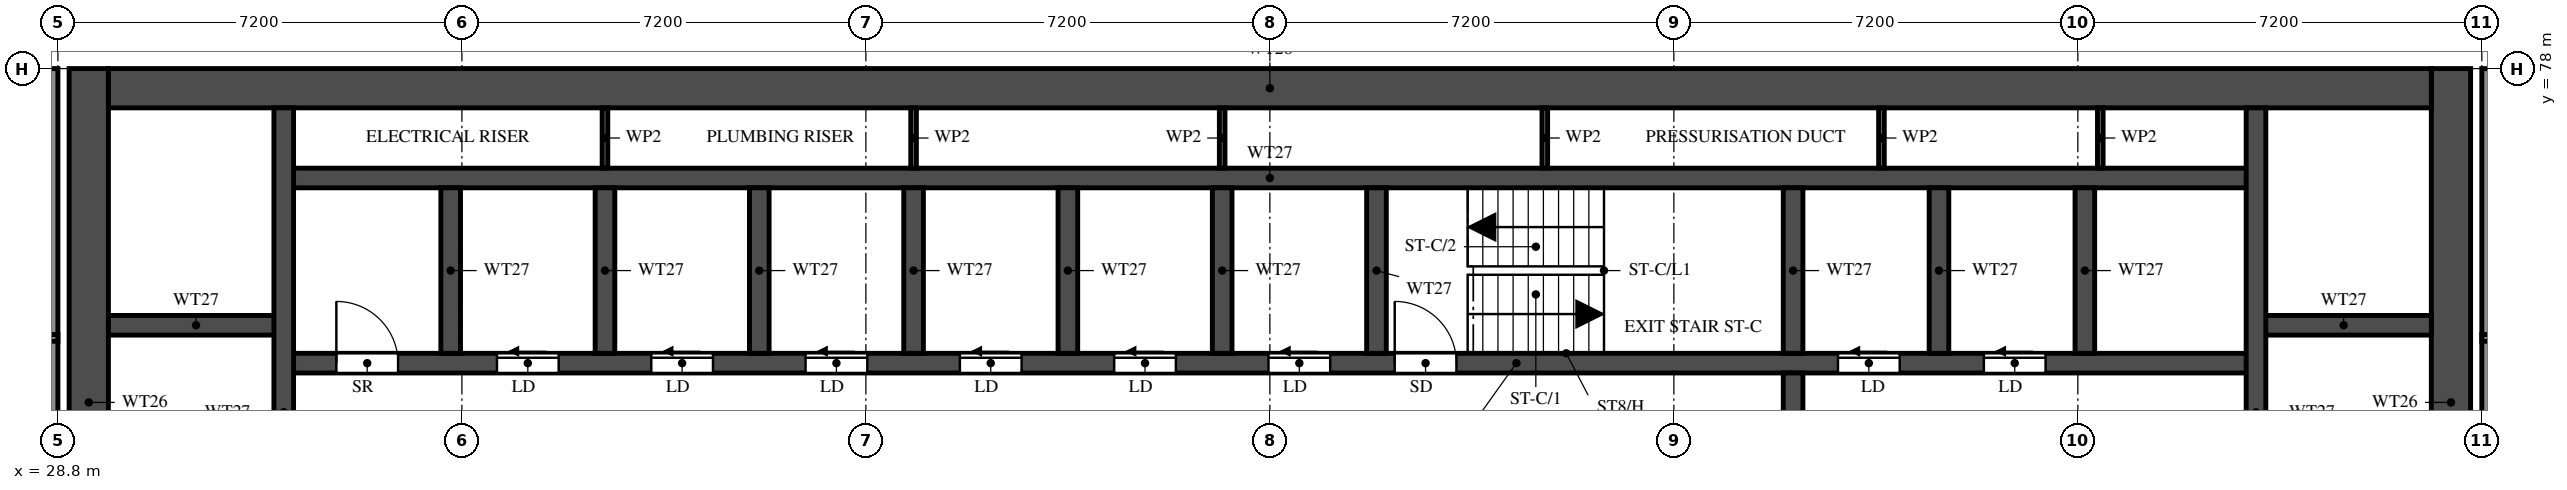
"""IFC4 building model, lengths in metres.
Left out: names, types, materials, properties, quantities, classifications, styles, units other than length and angle.
Written with IfcOpenShell. Run it as: python <this file> out.ifc"""

import sys

from ifc_helpers import new_model, si_unit, direction, frame, frame_2d, origin, place, context, subcontext, project, spatial, rectangle, extrude, element, fill, save


model = new_model("IFC4")
c1 = context("Model", 3, precision=1e-05, world=origin(), true_north=direction((0.0, 1.0)))
c2 = subcontext(c1, "Body", "Model", "MODEL_VIEW")
j1 = project(units=[si_unit("LENGTHUNIT", "METRE"), si_unit("PLANEANGLEUNIT", "RADIAN")], contexts=[c1])
p1 = place(None, origin())
s1 = spatial("IfcSite", under=j1, at=p1, CompositionType="ELEMENT")
p2 = place(p1, origin())
s2 = spatial("IfcBuilding", under=s1, at=p2, CompositionType="ELEMENT")
p3 = place(p2, frame((0.0, 0.0, 171.0)))
s3 = spatial("IfcBuildingStorey", under=s2, at=p3, CompositionType="ELEMENT", Elevation=171.0)
for number, where, z_axis, x_axis in (
    (1, (29.35, 66.1, 0.0), (0.0, 0.0, 1.0), (0.0, 1.0, 0.0)),
    (2, (71.45, 66.1, 0.0), (0.0, 0.0, 1.0), (0.0, 1.0, 0.0)),
):
    element("IfcWall", number, at=place(p3, frame(where, z_axis=z_axis, x_axis=x_axis)), inside=s3, PredefinedType="SHEAR", context=c2, shape_type="SweptSolid", body=[
        extrude(rectangle(XDim=11.9, YDim=0.7, at=frame_2d((5.95, 0.0))), origin(), (0.0, 0.0, 1.0), 3.2),
    ])
p4 = place(p3, frame((29.7, 77.65, 0.0), z_axis=(0.0, 0.0, 1.0), x_axis=(1.0, 0.0, 0.0)))
e3 = element("IfcWall", 3, at=p4, inside=s3, PredefinedType="SHEAR", context=c2, shape_type="SweptSolid", body=[
    extrude(rectangle(XDim=41.4, YDim=0.7, at=frame_2d((20.7, 0.0))), origin(), (0.0, 0.0, 1.0), 3.2),
])
p5 = place(p3, frame((32.825, 72.75, 0.0), z_axis=(0.0, 0.0, 1.0), x_axis=(1.0, 0.0, 0.0)))
e4 = element("IfcWall", 4, at=p5, inside=s3, PredefinedType="SHEAR", context=c2, shape_type="SweptSolid", body=[
    extrude(rectangle(XDim=35.15, YDim=0.35, at=frame_2d((17.575, 0.0))), origin(), (0.0, 0.0, 1.0), 3.2),
])
p6 = place(p5, frame((19.8, 0.0, 0.0)))
e5 = element("IfcOpeningElement", 5, at=p6, cuts=e4, PredefinedType="OPENING", context=c2, shape_type="SweptSolid", body=[
    extrude(rectangle(XDim=1.1, YDim=2.1, at=frame_2d((0.55, 1.05))), frame((0.0, 0.185, 0.0), z_axis=(0.0, -1.0, 0.0), x_axis=(1.0, 0.0, 0.0)), (0.0, 0.0, 1.0), 0.37),
])
p7 = place(p5, frame((27.7, 0.0, 0.0)))
e6 = element("IfcOpeningElement", 6, at=p7, cuts=e4, PredefinedType="OPENING", context=c2, shape_type="SweptSolid", body=[
    extrude(rectangle(XDim=1.1, YDim=2.1, at=frame_2d((0.55, 1.05))), frame((0.0, 0.185, 0.0), z_axis=(0.0, -1.0, 0.0), x_axis=(1.0, 0.0, 0.0)), (0.0, 0.0, 1.0), 0.37),
])
p8 = place(p5, frame((30.3, 0.0, 0.0)))
e7 = element("IfcOpeningElement", 7, at=p8, cuts=e4, PredefinedType="OPENING", context=c2, shape_type="SweptSolid", body=[
    extrude(rectangle(XDim=1.1, YDim=2.1, at=frame_2d((0.55, 1.05))), frame((0.0, 0.185, 0.0), z_axis=(0.0, -1.0, 0.0), x_axis=(1.0, 0.0, 0.0)), (0.0, 0.0, 1.0), 0.37),
])
p9 = place(p5, frame((3.8, 0.0, 0.0)))
e8 = element("IfcOpeningElement", 8, at=p9, cuts=e4, PredefinedType="OPENING", context=c2, shape_type="SweptSolid", body=[
    extrude(rectangle(XDim=1.1, YDim=2.1, at=frame_2d((0.55, 1.05))), frame((0.0, 0.185, 0.0), z_axis=(0.0, -1.0, 0.0), x_axis=(1.0, 0.0, 0.0)), (0.0, 0.0, 1.0), 0.37),
])
p10 = place(p5, frame((6.55, 0.0, 0.0)))
e9 = element("IfcOpeningElement", 9, at=p10, cuts=e4, PredefinedType="OPENING", context=c2, shape_type="SweptSolid", body=[
    extrude(rectangle(XDim=1.1, YDim=2.1, at=frame_2d((0.55, 1.05))), frame((0.0, 0.185, 0.0), z_axis=(0.0, -1.0, 0.0), x_axis=(1.0, 0.0, 0.0)), (0.0, 0.0, 1.0), 0.37),
])
p11 = place(p5, frame((9.3, 0.0, 0.0)))
e10 = element("IfcOpeningElement", 10, at=p11, cuts=e4, PredefinedType="OPENING", context=c2, shape_type="SweptSolid", body=[
    extrude(rectangle(XDim=1.1, YDim=2.1, at=frame_2d((0.55, 1.05))), frame((0.0, 0.185, 0.0), z_axis=(0.0, -1.0, 0.0), x_axis=(1.0, 0.0, 0.0)), (0.0, 0.0, 1.0), 0.37),
])
p12 = place(p5, frame((12.05, 0.0, 0.0)))
e11 = element("IfcOpeningElement", 11, at=p12, cuts=e4, PredefinedType="OPENING", context=c2, shape_type="SweptSolid", body=[
    extrude(rectangle(XDim=1.1, YDim=2.1, at=frame_2d((0.55, 1.05))), frame((0.0, 0.185, 0.0), z_axis=(0.0, -1.0, 0.0), x_axis=(1.0, 0.0, 0.0)), (0.0, 0.0, 1.0), 0.37),
])
p13 = place(p5, frame((14.8, 0.0, 0.0)))
e12 = element("IfcOpeningElement", 12, at=p13, cuts=e4, PredefinedType="OPENING", context=c2, shape_type="SweptSolid", body=[
    extrude(rectangle(XDim=1.1, YDim=2.1, at=frame_2d((0.55, 1.05))), frame((0.0, 0.185, 0.0), z_axis=(0.0, -1.0, 0.0), x_axis=(1.0, 0.0, 0.0)), (0.0, 0.0, 1.0), 0.37),
])
p14 = place(p5, frame((17.55, 0.0, 0.0)))
e13 = element("IfcOpeningElement", 13, at=p14, cuts=e4, PredefinedType="OPENING", context=c2, shape_type="SweptSolid", body=[
    extrude(rectangle(XDim=1.1, YDim=2.1, at=frame_2d((0.55, 1.05))), frame((0.0, 0.185, 0.0), z_axis=(0.0, -1.0, 0.0), x_axis=(1.0, 0.0, 0.0)), (0.0, 0.0, 1.0), 0.37),
])
p15 = place(p5, frame((0.938, 0.0, 0.0)))
e14 = element("IfcOpeningElement", 14, at=p15, cuts=e4, PredefinedType="OPENING", context=c2, shape_type="SweptSolid", body=[
    extrude(rectangle(XDim=1.1, YDim=2.1, at=frame_2d((0.55, 1.05))), frame((0.0, 0.185, 0.0), z_axis=(0.0, -1.0, 0.0), x_axis=(1.0, 0.0, 0.0)), (0.0, 0.0, 1.0), 0.37),
])
p16 = place(p3, frame((32.825, 76.05, 0.0), z_axis=(0.0, 0.0, 1.0), x_axis=(1.0, 0.0, 0.0)))
e15 = element("IfcWall", 15, at=p16, inside=s3, PredefinedType="SHEAR", context=c2, shape_type="SweptSolid", body=[
    extrude(rectangle(XDim=35.15, YDim=0.35, at=frame_2d((17.575, 0.0))), origin(), (0.0, 0.0, 1.0), 3.2),
])
for number, where, z_axis, x_axis in (
    (16, (29.7, 73.425, 0.0), (0.0, 0.0, 1.0), (1.0, 0.0, 0.0)),
    (17, (67.975, 73.425, 0.0), (0.0, 0.0, 1.0), (1.0, 0.0, 0.0)),
):
    element("IfcWall", number, at=place(p3, frame(where, z_axis=z_axis, x_axis=x_axis)), inside=s3, PredefinedType="SHEAR", context=c2, shape_type="SweptSolid", body=[
        extrude(rectangle(XDim=3.125, YDim=0.35, at=frame_2d((1.562, 0.0))), origin(), (0.0, 0.0, 1.0), 3.2),
    ])
p17 = place(p3, frame((32.825, 66.45, 0.0), z_axis=(0.0, 0.0, 1.0), x_axis=(0.0, 1.0, 0.0)))
e18 = element("IfcWall", 18, at=p17, inside=s3, PredefinedType="SHEAR", context=c2, shape_type="SweptSolid", body=[
    extrude(rectangle(XDim=10.85, YDim=0.35, at=frame_2d((5.425, 0.0))), origin(), (0.0, 0.0, 1.0), 3.2),
])
p18 = place(p3, frame((67.975, 66.45, 0.0), z_axis=(0.0, 0.0, 1.0), x_axis=(0.0, 1.0, 0.0)))
e19 = element("IfcWall", 19, at=p18, inside=s3, PredefinedType="SHEAR", context=c2, shape_type="SweptSolid", body=[
    extrude(rectangle(XDim=10.85, YDim=0.35, at=frame_2d((5.425, 0.0))), origin(), (0.0, 0.0, 1.0), 3.2),
])
p19 = place(p18, frame((0.15, 0.0, 0.0)))
e20 = element("IfcOpeningElement", 20, at=p19, cuts=e19, PredefinedType="OPENING", context=c2, shape_type="SweptSolid", body=[
    extrude(rectangle(XDim=1.1, YDim=2.1, at=frame_2d((0.55, 1.05))), frame((0.0, 0.185, 0.0), z_axis=(0.0, -1.0, 0.0), x_axis=(1.0, 0.0, 0.0)), (0.0, 0.0, 1.0), 0.37),
])
p20 = place(p3, frame((59.725, 66.45, 0.0), z_axis=(0.0, 0.0, 1.0), x_axis=(0.0, 1.0, 0.0)))
e21 = element("IfcWall", 21, at=p20, inside=s3, PredefinedType="SHEAR", context=c2, shape_type="SweptSolid", body=[
    extrude(rectangle(XDim=6.125, YDim=0.35, at=frame_2d((3.062, 0.0))), origin(), (0.0, 0.0, 1.0), 3.2),
])
p21 = place(p20, frame((3.85, 0.0, 0.0)))
e22 = element("IfcOpeningElement", 22, at=p21, cuts=e21, PredefinedType="OPENING", context=c2, shape_type="SweptSolid", body=[
    extrude(rectangle(XDim=1.2, YDim=2.1, at=frame_2d((0.6, 1.05))), frame((0.0, 0.185, 0.0), z_axis=(0.0, -1.0, 0.0), x_axis=(1.0, 0.0, 0.0)), (0.0, 0.0, 1.0), 0.37),
])
for number, where, z_axis, x_axis in (
    (23, (59.725, 72.925, 0.0), (0.0, 0.0, 1.0), (0.0, 1.0, 0.0)),
    (24, (35.8, 72.925, 0.0), (0.0, 0.0, 1.0), (0.0, 1.0, 0.0)),
    (25, (38.55, 72.925, 0.0), (0.0, 0.0, 1.0), (0.0, 1.0, 0.0)),
    (26, (41.3, 72.925, 0.0), (0.0, 0.0, 1.0), (0.0, 1.0, 0.0)),
    (27, (44.05, 72.925, 0.0), (0.0, 0.0, 1.0), (0.0, 1.0, 0.0)),
    (28, (46.8, 72.925, 0.0), (0.0, 0.0, 1.0), (0.0, 1.0, 0.0)),
    (29, (49.55, 72.925, 0.0), (0.0, 0.0, 1.0), (0.0, 1.0, 0.0)),
    (30, (52.3, 72.925, 0.0), (0.0, 0.0, 1.0), (0.0, 1.0, 0.0)),
    (31, (62.325, 72.925, 0.0), (0.0, 0.0, 1.0), (0.0, 1.0, 0.0)),
    (32, (64.925, 72.925, 0.0), (0.0, 0.0, 1.0), (0.0, 1.0, 0.0)),
):
    element("IfcWall", number, at=place(p3, frame(where, z_axis=z_axis, x_axis=x_axis)), inside=s3, PredefinedType="SHEAR", context=c2, shape_type="SweptSolid", body=[
        extrude(rectangle(XDim=2.95, YDim=0.35, at=frame_2d((1.475, 0.0))), origin(), (0.0, 0.0, 1.0), 3.2),
    ])
for number, where, z_axis, x_axis in (
    (33, (38.55, 76.225, 0.0), (0.0, 0.0, 1.0), (0.0, 1.0, 0.0)),
    (34, (44.05, 76.225, 0.0), (0.0, 0.0, 1.0), (0.0, 1.0, 0.0)),
    (35, (49.55, 76.225, 0.0), (0.0, 0.0, 1.0), (0.0, 1.0, 0.0)),
    (36, (55.3, 76.225, 0.0), (0.0, 0.0, 1.0), (0.0, 1.0, 0.0)),
    (37, (61.3, 76.225, 0.0), (0.0, 0.0, 1.0), (0.0, 1.0, 0.0)),
    (38, (65.2, 76.225, 0.0), (0.0, 0.0, 1.0), (0.0, 1.0, 0.0)),
):
    element("IfcWall", number, at=place(p3, frame(where, z_axis=z_axis, x_axis=x_axis)), inside=s3, PredefinedType="PARTITIONING", context=c2, shape_type="SweptSolid", body=[
        extrude(rectangle(XDim=1.075, YDim=0.1, at=frame_2d((0.538, 0.0))), origin(), (0.0, 0.0, 1.0), 3.2),
    ])
for number, where, z_axis, x_axis in (
    (39, (28.7, 62.4, 0.0), (0.0, 0.0, 1.0), (0.0, 1.0, 0.0)),
    (40, (72.1, 62.4, 0.0), (0.0, 0.0, 1.0), (0.0, 1.0, 0.0)),
):
    element("IfcWall", number, at=place(p3, frame(where, z_axis=z_axis, x_axis=x_axis)), inside=s3, PredefinedType="SOLIDWALL", context=c2, shape_type="SweptSolid", body=[
        extrude(rectangle(XDim=15.6, YDim=0.2, at=frame_2d((7.8, 0.0))), origin(), (0.0, 0.0, 1.0), 3.2),
    ])
p22 = place(p3, frame((14.525, 73.2, 0.0), z_axis=(0.0, 0.0, 1.0), x_axis=(1.0, 0.0, 0.0)))
e41 = element("IfcWall", 41, at=p22, inside=s3, PredefinedType="PARTITIONING", context=c2, shape_type="SweptSolid", body=[
    extrude(rectangle(XDim=14.275, YDim=0.12, at=frame_2d((7.138, 0.0))), origin(), (0.0, 0.0, 1.0), 2.3),
])
p23 = place(p22, frame((7.675, 0.0, 0.0)))
e42 = element("IfcOpeningElement", 42, at=p23, cuts=e41, PredefinedType="OPENING", context=c2, shape_type="SweptSolid", body=[
    extrude(rectangle(XDim=0.9, YDim=2.1, at=frame_2d((0.45, 1.05))), frame((0.0, 0.07, 0.0), z_axis=(0.0, -1.0, 0.0), x_axis=(1.0, 0.0, 0.0)), (0.0, 0.0, 1.0), 0.14),
])
p24 = place(p3, frame((72.0, 73.2, 0.0), z_axis=(0.0, 0.0, 1.0), x_axis=(1.0, 0.0, 0.0)))
e43 = element("IfcWall", 43, at=p24, inside=s3, PredefinedType="PARTITIONING", context=c2, shape_type="SweptSolid", body=[
    extrude(rectangle(XDim=14.275, YDim=0.12, at=frame_2d((7.137, 0.0))), origin(), (0.0, 0.0, 1.0), 2.3),
])
p25 = place(p24, frame((5.7, 0.0, 0.0)))
e44 = element("IfcOpeningElement", 44, at=p25, cuts=e43, PredefinedType="OPENING", context=c2, shape_type="SweptSolid", body=[
    extrude(rectangle(XDim=0.9, YDim=2.1, at=frame_2d((0.45, 1.05))), frame((0.0, 0.07, 0.0), z_axis=(0.0, -1.0, 0.0), x_axis=(1.0, 0.0, 0.0)), (0.0, 0.0, 1.0), 0.14),
])
p26 = place(p6, origin())
e45 = element("IfcDoor", 45, at=p26, inside=s3, OperationType="SINGLE_SWING_LEFT", PredefinedType="DOOR", context=c2, shape_type="SweptSolid", body=[
    extrude(rectangle(XDim=1.1, YDim=2.1, at=frame_2d((0.55, 1.05))), frame((0.0, 0.025, 0.0), z_axis=(0.0, -1.0, 0.0), x_axis=(1.0, 0.0, 0.0)), (0.0, 0.0, 1.0), 0.05),
])
fill(e5, e45)
p27 = place(p7, origin())
e46 = element("IfcDoor", 46, at=p27, inside=s3, OperationType="SLIDING_TO_LEFT", PredefinedType="DOOR", context=c2, shape_type="SweptSolid", body=[
    extrude(rectangle(XDim=1.1, YDim=2.1, at=frame_2d((0.55, 1.05))), frame((0.0, 0.025, 0.0), z_axis=(0.0, -1.0, 0.0), x_axis=(1.0, 0.0, 0.0)), (0.0, 0.0, 1.0), 0.05),
])
fill(e6, e46)
p28 = place(p8, origin())
e47 = element("IfcDoor", 47, at=p28, inside=s3, OperationType="SLIDING_TO_LEFT", PredefinedType="DOOR", context=c2, shape_type="SweptSolid", body=[
    extrude(rectangle(XDim=1.1, YDim=2.1, at=frame_2d((0.55, 1.05))), frame((0.0, 0.025, 0.0), z_axis=(0.0, -1.0, 0.0), x_axis=(1.0, 0.0, 0.0)), (0.0, 0.0, 1.0), 0.05),
])
fill(e7, e47)
p29 = place(p9, origin())
e48 = element("IfcDoor", 48, at=p29, inside=s3, OperationType="SLIDING_TO_LEFT", PredefinedType="DOOR", context=c2, shape_type="SweptSolid", body=[
    extrude(rectangle(XDim=1.1, YDim=2.1, at=frame_2d((0.55, 1.05))), frame((0.0, 0.025, 0.0), z_axis=(0.0, -1.0, 0.0), x_axis=(1.0, 0.0, 0.0)), (0.0, 0.0, 1.0), 0.05),
])
fill(e8, e48)
p30 = place(p10, origin())
e49 = element("IfcDoor", 49, at=p30, inside=s3, OperationType="SLIDING_TO_LEFT", PredefinedType="DOOR", context=c2, shape_type="SweptSolid", body=[
    extrude(rectangle(XDim=1.1, YDim=2.1, at=frame_2d((0.55, 1.05))), frame((0.0, 0.025, 0.0), z_axis=(0.0, -1.0, 0.0), x_axis=(1.0, 0.0, 0.0)), (0.0, 0.0, 1.0), 0.05),
])
fill(e9, e49)
p31 = place(p11, origin())
e50 = element("IfcDoor", 50, at=p31, inside=s3, OperationType="SLIDING_TO_LEFT", PredefinedType="DOOR", context=c2, shape_type="SweptSolid", body=[
    extrude(rectangle(XDim=1.1, YDim=2.1, at=frame_2d((0.55, 1.05))), frame((0.0, 0.025, 0.0), z_axis=(0.0, -1.0, 0.0), x_axis=(1.0, 0.0, 0.0)), (0.0, 0.0, 1.0), 0.05),
])
fill(e10, e50)
p32 = place(p12, origin())
e51 = element("IfcDoor", 51, at=p32, inside=s3, OperationType="SLIDING_TO_LEFT", PredefinedType="DOOR", context=c2, shape_type="SweptSolid", body=[
    extrude(rectangle(XDim=1.1, YDim=2.1, at=frame_2d((0.55, 1.05))), frame((0.0, 0.025, 0.0), z_axis=(0.0, -1.0, 0.0), x_axis=(1.0, 0.0, 0.0)), (0.0, 0.0, 1.0), 0.05),
])
fill(e11, e51)
p33 = place(p13, origin())
e52 = element("IfcDoor", 52, at=p33, inside=s3, OperationType="SLIDING_TO_LEFT", PredefinedType="DOOR", context=c2, shape_type="SweptSolid", body=[
    extrude(rectangle(XDim=1.1, YDim=2.1, at=frame_2d((0.55, 1.05))), frame((0.0, 0.025, 0.0), z_axis=(0.0, -1.0, 0.0), x_axis=(1.0, 0.0, 0.0)), (0.0, 0.0, 1.0), 0.05),
])
fill(e12, e52)
p34 = place(p14, origin())
e53 = element("IfcDoor", 53, at=p34, inside=s3, OperationType="SLIDING_TO_LEFT", PredefinedType="DOOR", context=c2, shape_type="SweptSolid", body=[
    extrude(rectangle(XDim=1.1, YDim=2.1, at=frame_2d((0.55, 1.05))), frame((0.0, 0.025, 0.0), z_axis=(0.0, -1.0, 0.0), x_axis=(1.0, 0.0, 0.0)), (0.0, 0.0, 1.0), 0.05),
])
fill(e13, e53)
p35 = place(p15, origin())
e54 = element("IfcDoor", 54, at=p35, inside=s3, OperationType="SINGLE_SWING_LEFT", PredefinedType="DOOR", context=c2, shape_type="SweptSolid", body=[
    extrude(rectangle(XDim=1.1, YDim=2.1, at=frame_2d((0.55, 1.05))), frame((0.0, 0.025, 0.0), z_axis=(0.0, -1.0, 0.0), x_axis=(1.0, 0.0, 0.0)), (0.0, 0.0, 1.0), 0.05),
])
fill(e14, e54)
save(model, sys.argv[1])
